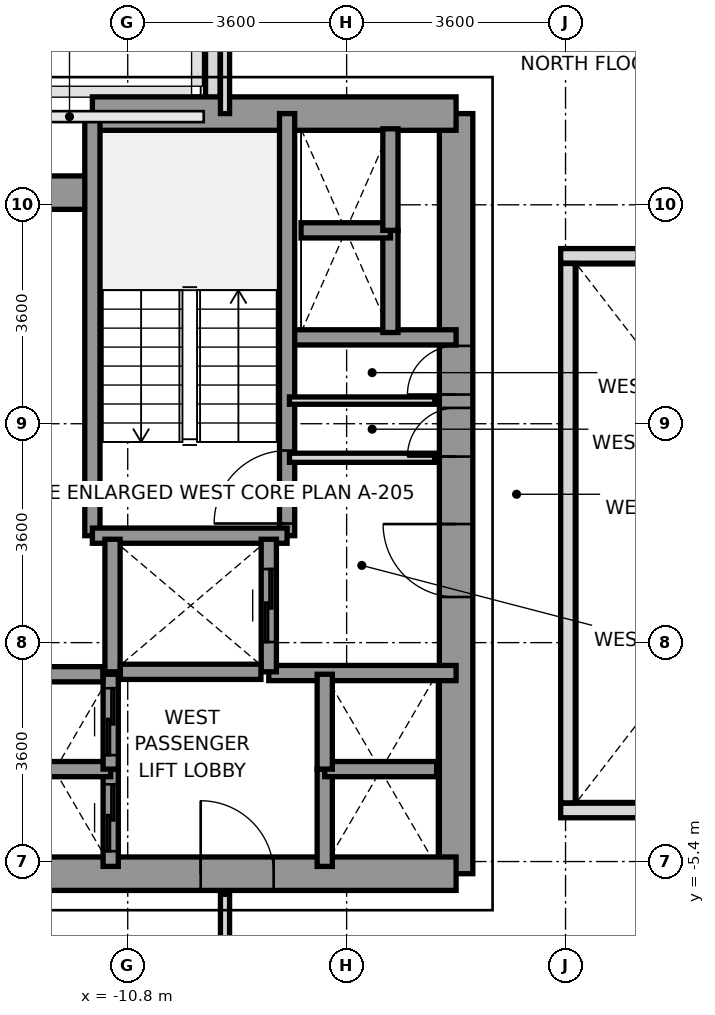
"""IFC4 building model, lengths in metres.
Left out: names, types, materials, properties, quantities, classifications, styles, units other than length and angle.
Written with IfcOpenShell. Run it as: python <this file> out.ifc"""

import sys

from ifc_helpers import new_model, si_unit, direction, frame, frame_2d, origin, place, context, subcontext, project, spatial, rectangle, extrude, source, transform, mapped, element, fill, save


model = new_model("IFC4")
c1 = context("Model", 3, precision=1e-05, world=origin(), true_north=direction((0.0, 1.0)))
c2 = subcontext(c1, "Body", "Model", "MODEL_VIEW")
j1 = project(units=[si_unit("LENGTHUNIT", "METRE"), si_unit("PLANEANGLEUNIT", "RADIAN")], contexts=[c1])
p1 = place(None, origin())
s1 = spatial("IfcSite", under=j1, at=p1, CompositionType="ELEMENT")
p2 = place(p1, origin())
s2 = spatial("IfcBuilding", under=s1, at=p2, CompositionType="ELEMENT")
p3 = place(p2, frame((0.0, 0.0, 81.6)))
s3 = spatial("IfcBuildingStorey", under=s2, at=p3, CompositionType="ELEMENT", Elevation=81.6)
p4 = place(p3, frame((-9.4, 6.953, 0.0), z_axis=(0.0, 0.0, 1.0), x_axis=(0.0, 1.0, 0.0)))
e1 = element("IfcWall", 1, at=p4, inside=s3, PredefinedType="PARAPET", context=c2, shape_type="SweptSolid", body=[
    extrude(rectangle(XDim=1.444, YDim=0.24, at=frame_2d((0.722, 0.0))), origin(), (0.0, 0.0, 1.0), 1.15),
])
p5 = place(p3, frame((-5.4, -5.6, 0.0), z_axis=(0.0, 0.0, 1.0), x_axis=(0.0, 1.0, 0.0)))
e2 = element("IfcWall", 2, at=p5, inside=s3, PredefinedType="SHEAR", context=c2, shape_type="SweptSolid", body=[
    extrude(rectangle(XDim=12.5, YDim=0.55, at=frame_2d((6.25, 0.0))), origin(), (0.0, 0.0, 1.0), 3.2),
])
p6 = place(p5, frame((4.55, 0.0, 0.0)))
e3 = element("IfcOpeningElement", 3, at=p6, cuts=e2, PredefinedType="OPENING", context=c2, shape_type="SweptSolid", body=[
    extrude(rectangle(XDim=1.2, YDim=2.2, at=frame_2d((0.6, 1.1))), frame((0.0, 0.285, 0.0), z_axis=(0.0, -1.0, 0.0), x_axis=(1.0, 0.0, 0.0)), (0.0, 0.0, 1.0), 0.57),
])
p7 = place(p5, frame((6.86, 0.0, 0.0)))
e4 = element("IfcOpeningElement", 4, at=p7, cuts=e2, PredefinedType="OPENING", context=c2, shape_type="SweptSolid", body=[
    extrude(rectangle(XDim=0.8, YDim=2.1, at=frame_2d((0.4, 1.05))), frame((0.0, 0.285, 0.0), z_axis=(0.0, -1.0, 0.0), x_axis=(1.0, 0.0, 0.0)), (0.0, 0.0, 1.0), 0.57),
])
p8 = place(p5, frame((7.88, 0.0, 0.0)))
e5 = element("IfcOpeningElement", 5, at=p8, cuts=e2, PredefinedType="OPENING", context=c2, shape_type="SweptSolid", body=[
    extrude(rectangle(XDim=0.8, YDim=2.1, at=frame_2d((0.4, 1.05))), frame((0.0, 0.285, 0.0), z_axis=(0.0, -1.0, 0.0), x_axis=(1.0, 0.0, 0.0)), (0.0, 0.0, 1.0), 0.57),
])
p9 = place(p3, frame((-11.381, 6.9, 0.0), z_axis=(0.0, 0.0, 1.0), x_axis=(1.0, 0.0, 0.0)))
e6 = element("IfcWall", 6, at=p9, inside=s3, PredefinedType="SHEAR", context=c2, shape_type="SweptSolid", body=[
    extrude(rectangle(XDim=5.981, YDim=0.55, at=frame_2d((2.991, 0.0))), origin(), (0.0, 0.0, 1.0), 3.2),
])
p10 = place(p3, frame((-13.2, 5.6, 0.0), z_axis=(0.0, 0.0, 1.0), x_axis=(1.0, 0.0, 0.0)))
e7 = element("IfcWall", 7, at=p10, inside=s3, PredefinedType="SHEAR", context=c2, shape_type="SweptSolid", body=[
    extrude(rectangle(XDim=1.819, YDim=0.55, at=frame_2d((0.909, 0.0))), origin(), (0.0, 0.0, 1.0), 3.2),
])
p11 = place(p3, frame((-13.2, -5.6, 0.0), z_axis=(0.0, 0.0, 1.0), x_axis=(1.0, 0.0, 0.0)))
e8 = element("IfcWall", 8, at=p11, inside=s3, PredefinedType="SHEAR", context=c2, shape_type="SweptSolid", body=[
    extrude(rectangle(XDim=7.8, YDim=0.55, at=frame_2d((3.9, 0.0))), origin(), (0.0, 0.0, 1.0), 3.2),
])
p12 = place(p11, frame((3.6, 0.0, 0.0)))
e9 = element("IfcOpeningElement", 9, at=p12, cuts=e8, PredefinedType="OPENING", context=c2, shape_type="SweptSolid", body=[
    extrude(rectangle(XDim=1.2, YDim=2.2, at=frame_2d((0.6, 1.1))), frame((0.0, 0.285, 0.0), z_axis=(0.0, -1.0, 0.0), x_axis=(1.0, 0.0, 0.0)), (0.0, 0.0, 1.0), 0.57),
])
p13 = place(p3, frame((-8.18, 3.22, 0.0), z_axis=(0.0, 0.0, 1.0), x_axis=(1.0, 0.0, 0.0)))
e10 = element("IfcWall", 10, at=p13, inside=s3, PredefinedType="SOLIDWALL", context=c2, shape_type="SweptSolid", body=[
    extrude(rectangle(XDim=2.78, YDim=0.25, at=frame_2d((1.39, 0.0))), origin(), (0.0, 0.0, 1.0), 3.2),
])
p14 = place(p3, frame((-8.48, -2.3, 0.0), z_axis=(0.0, 0.0, 1.0), x_axis=(1.0, 0.0, 0.0)))
e11 = element("IfcWall", 11, at=p14, inside=s3, PredefinedType="SOLIDWALL", context=c2, shape_type="SweptSolid", body=[
    extrude(rectangle(XDim=3.08, YDim=0.25, at=frame_2d((1.54, 0.0))), origin(), (0.0, 0.0, 1.0), 3.2),
])
p15 = place(p3, frame((-8.179, -0.041, 0.0), z_axis=(0.0, 0.0, 1.0), x_axis=(0.0, 1.0, 0.0)))
e12 = element("IfcWall", 12, at=p15, inside=s3, PredefinedType="SOLIDWALL", context=c2, shape_type="SweptSolid", body=[
    extrude(rectangle(XDim=6.941, YDim=0.25, at=frame_2d((3.47, 0.0))), origin(), (0.0, 0.0, 1.0), 3.2),
])
p16 = place(p15, frame((0.2, 0.0, 0.0)))
e13 = element("IfcOpeningElement", 13, at=p16, cuts=e12, PredefinedType="OPENING", context=c2, shape_type="SweptSolid", body=[
    extrude(rectangle(XDim=1.2, YDim=2.2, at=frame_2d((0.6, 1.1))), frame((0.0, 0.135, 0.0), z_axis=(0.0, -1.0, 0.0), x_axis=(1.0, 0.0, 0.0)), (0.0, 0.0, 1.0), 0.27),
])
p17 = place(p3, frame((-11.381, -0.041, 0.0), z_axis=(0.0, 0.0, 1.0), x_axis=(0.0, 1.0, 0.0)))
e14 = element("IfcWall", 14, at=p17, inside=s3, PredefinedType="SOLIDWALL", context=c2, shape_type="SweptSolid", body=[
    extrude(rectangle(XDim=6.941, YDim=0.25, at=frame_2d((3.47, 0.0))), origin(), (0.0, 0.0, 1.0), 3.2),
])
p18 = place(p3, frame((-11.381, -0.041, 0.0), z_axis=(0.0, 0.0, 1.0), x_axis=(1.0, 0.0, 0.0)))
e15 = element("IfcWall", 15, at=p18, inside=s3, PredefinedType="SOLIDWALL", context=c2, shape_type="SweptSolid", body=[
    extrude(rectangle(XDim=3.202, YDim=0.25, at=frame_2d((1.601, 0.0))), origin(), (0.0, 0.0, 1.0), 3.2),
])
p19 = place(p3, frame((-11.05, -2.28, 0.0), z_axis=(0.0, 0.0, 1.0), x_axis=(0.0, 1.0, 0.0)))
e16 = element("IfcWall", 16, at=p19, inside=s3, PredefinedType="SOLIDWALL", context=c2, shape_type="SweptSolid", body=[
    extrude(rectangle(XDim=2.18, YDim=0.25, at=frame_2d((1.09, 0.0))), origin(), (0.0, 0.0, 1.0), 3.2),
])
p20 = place(p3, frame((-8.48, -2.28, 0.0), z_axis=(0.0, 0.0, 1.0), x_axis=(0.0, 1.0, 0.0)))
e17 = element("IfcWall", 17, at=p20, inside=s3, PredefinedType="SOLIDWALL", context=c2, shape_type="SweptSolid", body=[
    extrude(rectangle(XDim=2.18, YDim=0.25, at=frame_2d((1.09, 0.0))), origin(), (0.0, 0.0, 1.0), 3.2),
])
p21 = place(p20, frame((0.49, 0.0, 0.0)))
e18 = element("IfcOpeningElement", 18, at=p21, cuts=e17, PredefinedType="OPENING", context=c2, shape_type="SweptSolid", body=[
    extrude(rectangle(XDim=1.2, YDim=2.2, at=frame_2d((0.6, 1.1))), frame((0.0, 0.135, 0.0), z_axis=(0.0, -1.0, 0.0), x_axis=(1.0, 0.0, 0.0)), (0.0, 0.0, 1.0), 0.27),
])
p22 = place(p3, frame((-10.921, -2.28, 0.0), z_axis=(0.0, 0.0, 1.0), x_axis=(1.0, 0.0, 0.0)))
e19 = element("IfcWall", 19, at=p22, inside=s3, PredefinedType="SOLIDWALL", context=c2, shape_type="SweptSolid", body=[
    extrude(rectangle(XDim=2.312, YDim=0.25, at=frame_2d((1.156, 0.0))), origin(), (0.0, 0.0, 1.0), 3.2),
])
p23 = place(p3, frame((-11.08, -5.48, 0.0), z_axis=(0.0, 0.0, 1.0), x_axis=(0.0, 1.0, 0.0)))
e20 = element("IfcWall", 20, at=p23, inside=s3, PredefinedType="SOLIDWALL", context=c2, shape_type="SweptSolid", body=[
    extrude(rectangle(XDim=1.6, YDim=0.25, at=frame_2d((0.8, 0.0))), origin(), (0.0, 0.0, 1.0), 3.2),
])
p24 = place(p23, frame((0.25, 0.0, 0.0)))
e21 = element("IfcOpeningElement", 21, at=p24, cuts=e20, PredefinedType="OPENING", context=c2, shape_type="SweptSolid", body=[
    extrude(rectangle(XDim=1.1, YDim=2.2, at=frame_2d((0.55, 1.1))), frame((0.0, 0.135, 0.0), z_axis=(0.0, -1.0, 0.0), x_axis=(1.0, 0.0, 0.0)), (0.0, 0.0, 1.0), 0.27),
])
p25 = place(p3, frame((-12.92, -3.88, 0.0), z_axis=(0.0, 0.0, 1.0), x_axis=(1.0, 0.0, 0.0)))
e22 = element("IfcWall", 22, at=p25, inside=s3, PredefinedType="SOLIDWALL", context=c2, shape_type="SweptSolid", body=[
    extrude(rectangle(XDim=1.84, YDim=0.25, at=frame_2d((0.92, 0.0))), origin(), (0.0, 0.0, 1.0), 3.2),
])
p26 = place(p3, frame((-11.08, -3.88, 0.0), z_axis=(0.0, 0.0, 1.0), x_axis=(0.0, 1.0, 0.0)))
e23 = element("IfcWall", 23, at=p26, inside=s3, PredefinedType="SOLIDWALL", context=c2, shape_type="SweptSolid", body=[
    extrude(rectangle(XDim=1.56, YDim=0.25, at=frame_2d((0.78, 0.0))), origin(), (0.0, 0.0, 1.0), 3.2),
])
p27 = place(p26, frame((0.23, 0.0, 0.0)))
e24 = element("IfcOpeningElement", 24, at=p27, cuts=e23, PredefinedType="OPENING", context=c2, shape_type="SweptSolid", body=[
    extrude(rectangle(XDim=1.1, YDim=2.2, at=frame_2d((0.55, 1.1))), frame((0.0, 0.135, 0.0), z_axis=(0.0, -1.0, 0.0), x_axis=(1.0, 0.0, 0.0)), (0.0, 0.0, 1.0), 0.27),
])
p28 = place(p3, frame((-12.791, -2.32, 0.0), z_axis=(0.0, 0.0, 1.0), x_axis=(1.0, 0.0, 0.0)))
e25 = element("IfcWall", 25, at=p28, inside=s3, PredefinedType="SOLIDWALL", context=c2, shape_type="SweptSolid", body=[
    extrude(rectangle(XDim=1.582, YDim=0.25, at=frame_2d((0.791, 0.0))), origin(), (0.0, 0.0, 1.0), 3.2),
])
p29 = place(p3, frame((-7.56, -5.48, 0.0), z_axis=(0.0, 0.0, 1.0), x_axis=(0.0, 1.0, 0.0)))
e26 = element("IfcWall", 26, at=p29, inside=s3, PredefinedType="SOLIDWALL", context=c2, shape_type="SweptSolid", body=[
    extrude(rectangle(XDim=1.6, YDim=0.25, at=frame_2d((0.8, 0.0))), origin(), (0.0, 0.0, 1.0), 3.2),
])
p30 = place(p3, frame((-7.56, -3.88, 0.0), z_axis=(0.0, 0.0, 1.0), x_axis=(1.0, 0.0, 0.0)))
e27 = element("IfcWall", 27, at=p30, inside=s3, PredefinedType="SOLIDWALL", context=c2, shape_type="SweptSolid", body=[
    extrude(rectangle(XDim=1.84, YDim=0.25, at=frame_2d((0.92, 0.0))), origin(), (0.0, 0.0, 1.0), 3.2),
])
p31 = place(p3, frame((-7.56, -3.88, 0.0), z_axis=(0.0, 0.0, 1.0), x_axis=(0.0, 1.0, 0.0)))
e28 = element("IfcWall", 28, at=p31, inside=s3, PredefinedType="SOLIDWALL", context=c2, shape_type="SweptSolid", body=[
    extrude(rectangle(XDim=1.56, YDim=0.25, at=frame_2d((0.78, 0.0))), origin(), (0.0, 0.0, 1.0), 3.2),
])
p32 = place(p3, frame((-6.48, 3.3, 0.0), z_axis=(0.0, 0.0, 1.0), x_axis=(0.0, 1.0, 0.0)))
e29 = element("IfcWall", 29, at=p32, inside=s3, PredefinedType="SOLIDWALL", context=c2, shape_type="SweptSolid", body=[
    extrude(rectangle(XDim=1.68, YDim=0.25, at=frame_2d((0.84, 0.0))), origin(), (0.0, 0.0, 1.0), 3.2),
])
p33 = place(p3, frame((-7.95, 4.98, 0.0), z_axis=(0.0, 0.0, 1.0), x_axis=(1.0, 0.0, 0.0)))
e30 = element("IfcWall", 30, at=p33, inside=s3, PredefinedType="SOLIDWALL", context=c2, shape_type="SweptSolid", body=[
    extrude(rectangle(XDim=1.47, YDim=0.25, at=frame_2d((0.735, 0.0))), origin(), (0.0, 0.0, 1.0), 3.2),
])
p34 = place(p3, frame((-6.48, 4.98, 0.0), z_axis=(0.0, 0.0, 1.0), x_axis=(0.0, 1.0, 0.0)))
e31 = element("IfcWall", 31, at=p34, inside=s3, PredefinedType="SOLIDWALL", context=c2, shape_type="SweptSolid", body=[
    extrude(rectangle(XDim=1.67, YDim=0.25, at=frame_2d((0.835, 0.0))), origin(), (0.0, 0.0, 1.0), 3.2),
])
p35 = place(p3, frame((-8.14, 1.24, 0.0), z_axis=(0.0, 0.0, 1.0), x_axis=(1.0, 0.0, 0.0)))
e32 = element("IfcWall", 32, at=p35, inside=s3, PredefinedType="PARTITIONING", context=c2, shape_type="SweptSolid", body=[
    extrude(rectangle(XDim=2.39, YDim=0.15, at=frame_2d((1.195, 0.0))), origin(), (0.0, 0.0, 1.0), 2.3),
])
p36 = place(p3, frame((-8.14, 2.18, 0.0), z_axis=(0.0, 0.0, 1.0), x_axis=(1.0, 0.0, 0.0)))
e33 = element("IfcWall", 33, at=p36, inside=s3, PredefinedType="PARTITIONING", context=c2, shape_type="SweptSolid", body=[
    extrude(rectangle(XDim=2.39, YDim=0.12, at=frame_2d((1.195, 0.0))), origin(), (0.0, 0.0, 1.0), 2.3),
])
p37 = place(p3, frame((-9.2, 6.9, 0.0), z_axis=(0.0, 0.0, 1.0), x_axis=(0.0, 1.0, 0.0)))
e34 = element("IfcWall", 34, at=p37, inside=s3, PredefinedType="PARTITIONING", context=c2, shape_type="SweptSolid", body=[
    extrude(rectangle(XDim=8.78, YDim=0.15, at=frame_2d((4.39, 0.0))), origin(), (0.0, 0.0, 1.0), 2.71),
])
p38 = place(p3, frame((-9.2, -15.68, 0.0), z_axis=(0.0, 0.0, 1.0), x_axis=(0.0, 1.0, 0.0)))
e35 = element("IfcWall", 35, at=p38, inside=s3, PredefinedType="PARTITIONING", context=c2, shape_type="SweptSolid", body=[
    extrude(rectangle(XDim=9.74, YDim=0.15, at=frame_2d((4.87, 0.0))), origin(), (0.0, 0.0, 1.0), 2.71),
])
for number, where, z_axis, x_axis in (
    (36, (-3.68, -4.56, 0.0), (0.0, 0.0, 1.0), (1.0, 0.0, 0.0)),
    (37, (-3.68, 4.56, 0.0), (0.0, 0.0, 1.0), (1.0, 0.0, 0.0)),
):
    element("IfcWall", number, at=place(p3, frame(where, z_axis=z_axis, x_axis=x_axis)), inside=s3, PredefinedType="PARAPET", context=c2, shape_type="SweptSolid", body=[
        extrude(rectangle(XDim=7.36, YDim=0.24, at=frame_2d((3.68, 0.0))), origin(), (0.0, 0.0, 1.0), 1.15),
    ])
p39 = place(p3, frame((-3.56, -4.435, 0.0), z_axis=(0.0, 0.0, 1.0), x_axis=(0.0, 1.0, 0.0)))
e38 = element("IfcWall", 38, at=p39, inside=s3, PredefinedType="PARAPET", context=c2, shape_type="SweptSolid", body=[
    extrude(rectangle(XDim=8.87, YDim=0.24, at=frame_2d((4.435, 0.0))), origin(), (0.0, 0.0, 1.0), 1.15),
])
m1 = source(origin(), c2, "Body", "SweptSolid", [
    extrude(rectangle(XDim=1.2, YDim=2.2, at=frame_2d((0.6, 1.1))), frame((0.0, 0.025, 0.0), z_axis=(0.0, -1.0, 0.0), x_axis=(1.0, 0.0, 0.0)), (0.0, 0.0, 1.0), 0.05),
])
p40 = place(p16, origin())
e39 = element("IfcDoor", 39, at=p40, inside=s3, OperationType="SINGLE_SWING_LEFT", PredefinedType="DOOR", context=c2, shape_type="MappedRepresentation", body=[
    mapped(m1, transform((0.0, 0.0, 0.0), x_axis=(1.0, 0.0, 0.0), y_axis=(0.0, 1.0, 0.0), z_axis=(0.0, 0.0, 1.0), scale=1.0)),
])
fill(e13, e39)
p41 = place(p6, origin())
e40 = element("IfcDoor", 40, at=p41, inside=s3, OperationType="SINGLE_SWING_RIGHT", PredefinedType="DOOR", context=c2, shape_type="MappedRepresentation", body=[
    mapped(m1, transform((0.0, 0.0, 0.0), x_axis=(1.0, 0.0, 0.0), y_axis=(0.0, 1.0, 0.0), z_axis=(0.0, 0.0, 1.0), scale=1.0)),
])
fill(e3, e40)
p42 = place(p12, origin())
e41 = element("IfcDoor", 41, at=p42, inside=s3, OperationType="SINGLE_SWING_LEFT", PredefinedType="DOOR", context=c2, shape_type="MappedRepresentation", body=[
    mapped(m1, transform((0.0, 0.0, 0.0), x_axis=(1.0, 0.0, 0.0), y_axis=(0.0, 1.0, 0.0), z_axis=(0.0, 0.0, 1.0), scale=1.0)),
])
fill(e9, e41)
m2 = source(origin(), c2, "Body", "SweptSolid", [
    extrude(rectangle(XDim=0.8, YDim=2.1, at=frame_2d((0.4, 1.05))), frame((0.0, 0.025, 0.0), z_axis=(0.0, -1.0, 0.0), x_axis=(1.0, 0.0, 0.0)), (0.0, 0.0, 1.0), 0.05),
])
p43 = place(p7, origin())
e42 = element("IfcDoor", 42, at=p43, inside=s3, OperationType="SINGLE_SWING_LEFT", PredefinedType="DOOR", context=c2, shape_type="MappedRepresentation", body=[
    mapped(m2, transform((0.0, 0.0, 0.0), x_axis=(1.0, 0.0, 0.0), y_axis=(0.0, 1.0, 0.0), z_axis=(0.0, 0.0, 1.0), scale=1.0)),
])
fill(e4, e42)
p44 = place(p8, origin())
e43 = element("IfcDoor", 43, at=p44, inside=s3, OperationType="SINGLE_SWING_LEFT", PredefinedType="DOOR", context=c2, shape_type="MappedRepresentation", body=[
    mapped(m2, transform((0.0, 0.0, 0.0), x_axis=(1.0, 0.0, 0.0), y_axis=(0.0, 1.0, 0.0), z_axis=(0.0, 0.0, 1.0), scale=1.0)),
])
fill(e5, e43)
p45 = place(p21, origin())
e44 = element("IfcDoor", 44, at=p45, inside=s3, OperationType="SLIDING_TO_RIGHT", PredefinedType="DOOR", context=c2, shape_type="MappedRepresentation", body=[
    mapped(m1, transform((0.0, 0.0, 0.0), x_axis=(1.0, 0.0, 0.0), y_axis=(0.0, 1.0, 0.0), z_axis=(0.0, 0.0, 1.0), scale=1.0)),
])
fill(e18, e44)
m3 = source(origin(), c2, "Body", "SweptSolid", [
    extrude(rectangle(XDim=1.1, YDim=2.2, at=frame_2d((0.55, 1.1))), frame((0.0, 0.025, 0.0), z_axis=(0.0, -1.0, 0.0), x_axis=(1.0, 0.0, 0.0)), (0.0, 0.0, 1.0), 0.05),
])
p46 = place(p24, origin())
e45 = element("IfcDoor", 45, at=p46, inside=s3, OperationType="SLIDING_TO_LEFT", PredefinedType="DOOR", context=c2, shape_type="MappedRepresentation", body=[
    mapped(m3, transform((0.0, 0.0, 0.0), x_axis=(1.0, 0.0, 0.0), y_axis=(0.0, 1.0, 0.0), z_axis=(0.0, 0.0, 1.0), scale=1.0)),
])
fill(e21, e45)
p47 = place(p27, origin())
e46 = element("IfcDoor", 46, at=p47, inside=s3, OperationType="SLIDING_TO_LEFT", PredefinedType="DOOR", context=c2, shape_type="MappedRepresentation", body=[
    mapped(m3, transform((0.0, 0.0, 0.0), x_axis=(1.0, 0.0, 0.0), y_axis=(0.0, 1.0, 0.0), z_axis=(0.0, 0.0, 1.0), scale=1.0)),
])
fill(e24, e46)
save(model, sys.argv[1])
